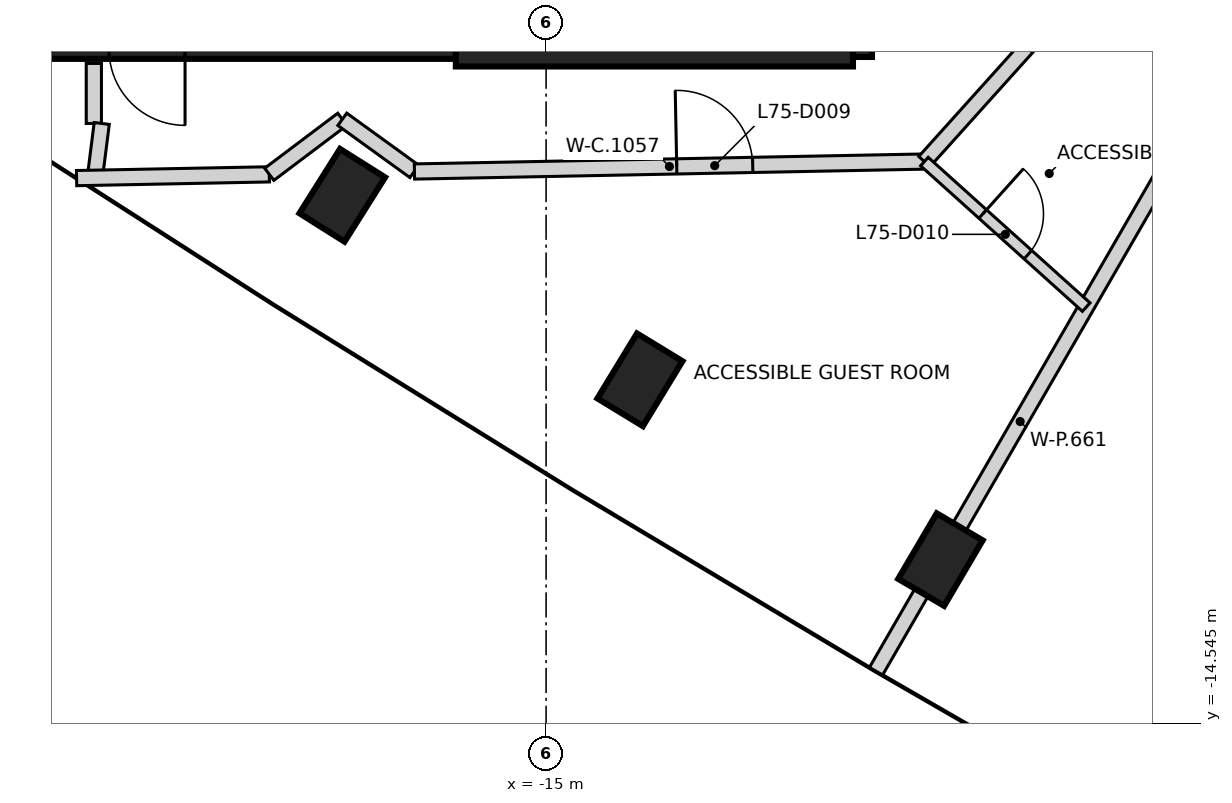
"""IFC4 building model, lengths in metres.
Left out: names, types, materials, properties, quantities, classifications, styles, units other than length and angle.
Written with IfcOpenShell. Run it as: python <this file> out.ifc"""

import sys

from ifc_helpers import new_model, si_unit, direction, frame, frame_2d, origin, origin_2d, place, context, subcontext, project, spatial, rectangle, extrude, element, fill, save


model = new_model("IFC4")
c1 = context("Model", 3, precision=1e-05, world=origin(), true_north=direction((0.0, 1.0)))
c2 = subcontext(c1, "Body", "Model", "MODEL_VIEW")
j1 = project(units=[si_unit("LENGTHUNIT", "METRE"), si_unit("PLANEANGLEUNIT", "RADIAN")], contexts=[c1])
p1 = place(None, origin())
s1 = spatial("IfcSite", under=j1, at=p1, CompositionType="ELEMENT")
p2 = place(p1, origin())
s2 = spatial("IfcBuilding", under=s1, at=p2, CompositionType="ELEMENT")
p3 = place(p2, frame((0.0, 0.0, 298.2)))
s3 = spatial("IfcBuildingStorey", under=s2, at=p3, CompositionType="ELEMENT", Elevation=298.2)
for number, where, z_axis, x_axis in (
    (1, (-17.681, -7.595, -0.35), (0.0, 0.0, 1.0), (0.533, 0.846, 0.0)),
    (2, (-13.765, -10.022, -0.35), (0.0, 0.0, 1.0), (0.52, 0.854, 0.0)),
    (3, (-9.812, -12.388, -0.35), (0.0, 0.0, 1.0), (0.507, 0.862, 0.0)),
):
    element("IfcColumn", number, at=place(p3, frame(where, z_axis=z_axis, x_axis=x_axis)), inside=s3, PredefinedType="COLUMN", context=c2, shape_type="SweptSolid", body=[
        extrude(rectangle(XDim=1.0, YDim=0.7, at=origin_2d()), origin(), (0.0, 0.0, 1.0), 2.64),
    ])
p4 = place(p3, frame((-10.837, 5.775, 0.0), z_axis=(0.0, 0.0, 1.0), x_axis=(0.0, -1.0, 0.0)))
e4 = element("IfcWall", 4, at=p4, inside=s3, PredefinedType="SHEAR", context=c2, shape_type="SweptSolid", body=[
    extrude(rectangle(XDim=11.55, YDim=0.25, at=frame_2d((5.775, 0.0))), origin(), (0.0, 0.0, 1.0), 3.2),
])
p5 = place(p4, frame((10.025, 0.0, 0.0)))
e5 = element("IfcOpeningElement", 5, at=p5, cuts=e4, PredefinedType="OPENING", context=c2, shape_type="SweptSolid", body=[
    extrude(rectangle(XDim=1.2, YDim=2.1, at=frame_2d((0.6, 1.05))), frame((0.0, 0.135, 0.0), z_axis=(0.0, -1.0, 0.0), x_axis=(1.0, 0.0, 0.0)), (0.0, 0.0, 1.0), 0.27),
])
p6 = place(p4, frame((8.725, 0.0, 0.0)))
e6 = element("IfcOpeningElement", 6, at=p6, cuts=e4, PredefinedType="OPENING", context=c2, shape_type="SweptSolid", body=[
    extrude(rectangle(XDim=1.2, YDim=2.1, at=frame_2d((0.6, 1.05))), frame((0.0, 0.135, 0.0), z_axis=(0.0, -1.0, 0.0), x_axis=(1.0, 0.0, 0.0)), (0.0, 0.0, 1.0), 0.27),
])
p7 = place(p3, frame((-16.187, -5.675, 0.0), z_axis=(0.0, 0.0, 1.0), x_axis=(-1.0, 0.0, 0.0)))
e7 = element("IfcWall", 7, at=p7, inside=s3, PredefinedType="SHEAR", context=c2, shape_type="SweptSolid", body=[
    extrude(rectangle(XDim=6.125, YDim=0.25, at=frame_2d((3.062, 0.0))), origin(), (0.0, 0.0, 1.0), 3.2),
])
p8 = place(p7, frame((3.563, 0.0, 0.0)))
e8 = element("IfcOpeningElement", 8, at=p8, cuts=e7, PredefinedType="OPENING", context=c2, shape_type="SweptSolid", body=[
    extrude(rectangle(XDim=1.0, YDim=2.1, at=frame_2d((0.5, 1.05))), frame((0.0, 0.135, 0.0), z_axis=(0.0, -1.0, 0.0), x_axis=(1.0, 0.0, 0.0)), (0.0, 0.0, 1.0), 0.27),
])
p9 = place(p3, frame((-10.963, -5.775, 0.0), z_axis=(0.0, 0.0, 1.0), x_axis=(-1.0, 0.0, 0.0)))
e9 = element("IfcWall", 9, at=p9, inside=s3, PredefinedType="SHEAR", context=c2, shape_type="SweptSolid", body=[
    extrude(rectangle(XDim=5.225, YDim=0.25, at=frame_2d((2.612, 0.0))), origin(), (0.0, 0.0, 1.0), 3.2),
])
p10 = place(p3, frame((-20.95, -6.65, 0.0), z_axis=(0.0, 0.0, 1.0), x_axis=(0.0, 1.0, 0.0)))
e10 = element("IfcWall", 10, at=p10, inside=s3, PredefinedType="PARTITIONING", context=c2, shape_type="SweptSolid", body=[
    extrude(rectangle(XDim=0.79, YDim=0.2, at=frame_2d((0.395, 0.0))), origin(), (0.0, 0.0, 1.0), 3.2),
])
p11 = place(p3, frame((-20.929, -7.305, 0.0), z_axis=(0.0, 0.0, 1.0), x_axis=(0.125718385971, 0.992065969293, 0.0)))
e11 = element("IfcWall", 11, at=p11, inside=s3, PredefinedType="PARTITIONING", context=c2, shape_type="SweptSolid", body=[
    extrude(rectangle(XDim=0.66, YDim=0.2, at=frame_2d((0.33, 0.0))), origin(), (0.0, 0.0, 1.0), 3.2),
])
p12 = place(p3, frame((-21.177, -7.369, 0.0), z_axis=(0.0, 0.0, 1.0), x_axis=(0.999808930271, 0.019547453804, 0.0)))
e12 = element("IfcWall", 12, at=p12, inside=s3, PredefinedType="PARTITIONING", context=c2, shape_type="SweptSolid", body=[
    extrude(rectangle(XDim=2.535, YDim=0.2, at=frame_2d((1.268, 0.0))), origin(), (0.0, 0.0, 1.0), 3.2),
])
p13 = place(p3, frame((-18.642, -7.319, 0.0), z_axis=(0.0, 0.0, 1.0), x_axis=(0.798707882989, 0.601718968998, 0.0)))
e13 = element("IfcWall", 13, at=p13, inside=s3, PredefinedType="PARTITIONING", context=c2, shape_type="SweptSolid", body=[
    extrude(rectangle(XDim=1.203, YDim=0.2, at=frame_2d((0.602, 0.0))), origin(), (0.0, 0.0, 1.0), 2.29),
])
p14 = place(p3, frame((-17.681, -6.595, 0.0), z_axis=(0.0, 0.0, 1.0), x_axis=(0.810123213102, -0.586259652026, 0.0)))
e14 = element("IfcWall", 14, at=p14, inside=s3, PredefinedType="PARTITIONING", context=c2, shape_type="SweptSolid", body=[
    extrude(rectangle(XDim=1.17, YDim=0.2, at=frame_2d((0.585, 0.0))), origin(), (0.0, 0.0, 1.0), 3.2),
])
p15 = place(p3, frame((-16.732, -7.282, 0.0), z_axis=(0.0, 0.0, 1.0), x_axis=(0.999809119854, 0.019537754635, 0.0)))
e15 = element("IfcWall", 15, at=p15, inside=s3, PredefinedType="PARTITIONING", context=c2, shape_type="SweptSolid", body=[
    extrude(rectangle(XDim=6.71, YDim=0.2, at=frame_2d((3.355, 0.0))), origin(), (0.0, 0.0, 1.0), 3.2),
])
p16 = place(p15, frame((3.451, 0.0, 0.0)))
e16 = element("IfcOpeningElement", 16, at=p16, cuts=e15, PredefinedType="OPENING", context=c2, shape_type="SweptSolid", body=[
    extrude(rectangle(XDim=1.0, YDim=2.1, at=frame_2d((0.5, 1.05))), frame((0.0, 0.11, 0.0), z_axis=(0.0, -1.0, 0.0), x_axis=(1.0, 0.0, 0.0)), (0.0, 0.0, 1.0), 0.22),
])
p17 = place(p3, frame((-10.023, -7.151, 0.0), z_axis=(0.0, 0.0, 1.0), x_axis=(0.668804583793, 0.743438248073, 0.0)))
e17 = element("IfcWall", 17, at=p17, inside=s3, PredefinedType="PARTITIONING", context=c2, shape_type="SweptSolid", body=[
    extrude(rectangle(XDim=2.021, YDim=0.2, at=frame_2d((1.011, 0.0))), origin(), (0.0, 0.0, 1.0), 3.2),
])
p18 = place(p3, frame((-10.659, -13.856, 0.0), z_axis=(0.0, 0.0, 1.0), x_axis=(0.49995742368, 0.866049983839, 0.0)))
e18 = element("IfcWall", 18, at=p18, inside=s3, PredefinedType="PARTITIONING", context=c2, shape_type="SweptSolid", body=[
    extrude(rectangle(XDim=7.585, YDim=0.2, at=frame_2d((3.792, 0.0))), origin(), (0.0, 0.0, 1.0), 3.2),
])
p19 = place(p3, frame((-10.023, -7.151, 0.0), z_axis=(0.0, 0.0, 1.0), x_axis=(0.743463699468, -0.668776291127, 0.0)))
e19 = element("IfcWall", 19, at=p19, inside=s3, PredefinedType="PARTITIONING", context=c2, shape_type="SweptSolid", body=[
    extrude(rectangle(XDim=2.864, YDim=0.15, at=frame_2d((1.432, 0.0))), origin(), (0.0, 0.0, 1.0), 3.2),
])
p20 = place(p19, frame((1.032, 0.0, 0.0)))
e20 = element("IfcOpeningElement", 20, at=p20, cuts=e19, PredefinedType="OPENING", context=c2, shape_type="SweptSolid", body=[
    extrude(rectangle(XDim=0.8, YDim=2.1, at=frame_2d((0.4, 1.05))), frame((0.0, 0.085, 0.0), z_axis=(0.0, -1.0, 0.0), x_axis=(1.0, 0.0, 0.0)), (0.0, 0.0, 1.0), 0.17),
])
p21 = place(p16, frame((1.0, 0.0, 0.0), z_axis=(0.0, 0.0, 1.0), x_axis=(-1.0, 0.0, 0.0)))
e21 = element("IfcDoor", 21, at=p21, inside=s3, OperationType="SINGLE_SWING_LEFT", PredefinedType="DOOR", context=c2, shape_type="SweptSolid", body=[
    extrude(rectangle(XDim=1.0, YDim=2.1, at=frame_2d((0.5, 1.05))), frame((0.0, 0.025, 0.0), z_axis=(0.0, -1.0, 0.0), x_axis=(1.0, 0.0, 0.0)), (0.0, 0.0, 1.0), 0.05),
])
fill(e16, e21)
p22 = place(p20, frame((0.8, 0.0, 0.0), z_axis=(0.0, 0.0, 1.0), x_axis=(-1.0, 0.0, 0.0)))
e22 = element("IfcDoor", 22, at=p22, inside=s3, OperationType="SINGLE_SWING_LEFT", PredefinedType="DOOR", context=c2, shape_type="SweptSolid", body=[
    extrude(rectangle(XDim=0.8, YDim=2.1, at=frame_2d((0.4, 1.05))), frame((0.0, 0.025, 0.0), z_axis=(0.0, -1.0, 0.0), x_axis=(1.0, 0.0, 0.0)), (0.0, 0.0, 1.0), 0.05),
])
fill(e20, e22)
save(model, sys.argv[1])
